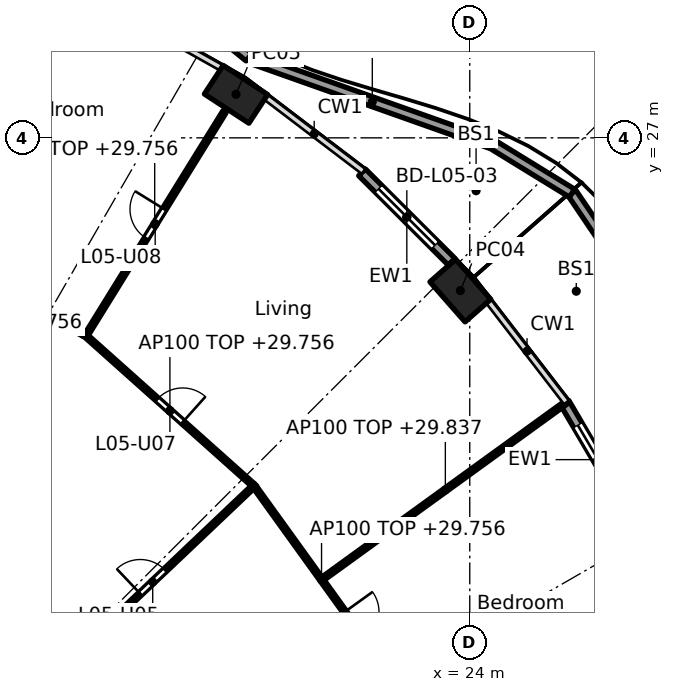
"""IFC4 building model, lengths in metres.
Left out: names, types, materials, properties, quantities, classifications, styles, units other than length and angle.
Written with IfcOpenShell. Run it as: python <this file> out.ifc"""

import sys

from ifc_helpers import new_model, si_unit, direction, frame, frame_2d, origin, origin_2d, place, context, subcontext, project, spatial, rectangle, hollow_rectangle, extrude, element, fill, save


model = new_model("IFC4")
c1 = context("Model", 3, precision=1e-05, world=origin(), true_north=direction((0.0, 1.0)))
c2 = subcontext(c1, "Body", "Model", "MODEL_VIEW")
j1 = project(units=[si_unit("LENGTHUNIT", "METRE"), si_unit("PLANEANGLEUNIT", "RADIAN")], contexts=[c1])
p1 = place(None, origin())
s1 = spatial("IfcSite", under=j1, at=p1, CompositionType="ELEMENT")
p2 = place(p1, origin())
s2 = spatial("IfcBuilding", under=s1, at=p2, CompositionType="ELEMENT")
p3 = place(p2, frame((0.0, 0.0, 27.0)))
s3 = spatial("IfcBuildingStorey", under=s2, at=p3, CompositionType="ELEMENT", Elevation=27.0)
for number, where, z_axis, x_axis in (
    (1, (23.752, 22.981, 0.0), (0.0, 0.0, 1.0), (-0.66, 0.751, 0.0)),
    (2, (17.85, 28.146, 0.0), (0.0, 0.0, 1.0), (-0.836, 0.549, 0.0)),
):
    element("IfcColumn", number, at=place(p3, frame(where, z_axis=z_axis, x_axis=x_axis)), inside=s3, PredefinedType="COLUMN", context=c2, shape_type="SweptSolid", body=[
        extrude(hollow_rectangle(XDim=1.4, YDim=0.9, WallThickness=0.05, at=origin_2d()), origin(), (0.0, 0.0, 1.0), 3.7),
    ])
p4 = place(p3, frame((26.5, 20.026, 0.0), z_axis=(0.0, 0.0, 1.0), x_axis=(0.506311160839, -0.862350861546, 0.0)))
e3 = element("IfcWall", 3, at=p4, inside=s3, PredefinedType="SOLIDWALL", context=c2, shape_type="SweptSolid", body=[
    extrude(rectangle(XDim=3.462, YDim=0.25, at=frame_2d((1.731, 0.0))), origin(), (0.0, 0.0, 1.0), 3.44),
])
p5 = place(p4, frame((0.681, 0.0, 0.0)))
e4 = element("IfcOpeningElement", 4, at=p5, cuts=e3, PredefinedType="OPENING", context=c2, shape_type="SweptSolid", body=[
    extrude(rectangle(XDim=2.1, YDim=2.4, at=frame_2d((1.05, 1.2))), frame((0.0, 0.135, 0.0), z_axis=(0.0, -1.0, 0.0), x_axis=(1.0, 0.0, 0.0)), (0.0, 0.0, 1.0), 0.27),
])
p6 = place(p3, frame((21.166, 26.092, 0.0), z_axis=(0.0, 0.0, 1.0), x_axis=(0.707803094595, -0.706409781417, 0.0)))
e5 = element("IfcWall", 5, at=p6, inside=s3, PredefinedType="SOLIDWALL", context=c2, shape_type="SweptSolid", body=[
    extrude(rectangle(XDim=3.329, YDim=0.25, at=frame_2d((1.665, 0.0))), origin(), (0.0, 0.0, 1.0), 3.44),
])
p7 = place(p6, frame((0.615, 0.0, 0.0)))
e6 = element("IfcOpeningElement", 6, at=p7, cuts=e5, PredefinedType="OPENING", context=c2, shape_type="SweptSolid", body=[
    extrude(rectangle(XDim=2.1, YDim=2.4, at=frame_2d((1.05, 1.2))), frame((0.0, 0.135, 0.0), z_axis=(0.0, -1.0, 0.0), x_axis=(1.0, 0.0, 0.0)), (0.0, 0.0, 1.0), 0.27),
])
p8 = place(p3, frame((28.54, 22.818, 0.0), z_axis=(0.0, 0.0, 1.0), x_axis=(-0.560884144234, 0.827894302883, 0.0)))
e7 = element("IfcWall", 7, at=p8, inside=s3, PredefinedType="PARAPET", context=c2, shape_type="SweptSolid", body=[
    extrude(rectangle(XDim=3.299, YDim=0.25, at=frame_2d((1.649, 0.0))), origin(), (0.0, 0.0, 1.0), 1.1),
])
p9 = place(p3, frame((26.691, 25.545, 0.0), z_axis=(0.0, 0.0, 1.0), x_axis=(-0.852196394013, 0.523222042761, 0.0)))
e8 = element("IfcWall", 8, at=p9, inside=s3, PredefinedType="PARAPET", context=c2, shape_type="SweptSolid", body=[
    extrude(rectangle(XDim=2.428, YDim=0.25, at=frame_2d((1.214, 0.0))), origin(), (0.0, 0.0, 1.0), 1.1),
])
p10 = place(p3, frame((24.573, 26.838, 0.0), z_axis=(0.0, 0.0, 1.0), x_axis=(-0.94252427227, 0.334137690453, 0.0)))
e9 = element("IfcWall", 9, at=p10, inside=s3, PredefinedType="PARAPET", context=c2, shape_type="SweptSolid", body=[
    extrude(rectangle(XDim=6.657, YDim=0.25, at=frame_2d((3.329, 0.0))), origin(), (0.0, 0.0, 1.0), 1.1),
])
p11 = place(p3, frame((18.193, 29.122, 0.0), z_axis=(0.0, 0.0, 1.0), x_axis=(-0.777298307168, 0.62913221319, 0.0)))
e10 = element("IfcWall", 10, at=p11, inside=s3, PredefinedType="PARAPET", context=c2, shape_type="SweptSolid", body=[
    extrude(rectangle(XDim=3.937, YDim=0.25, at=frame_2d((1.968, 0.0))), origin(), (0.0, 0.0, 1.0), 1.1),
])
p12 = place(p3, frame((21.849, 12.948, 0.0), z_axis=(0.0, 0.0, 1.0), x_axis=(-0.584563700282, 0.811347817099, 0.0)))
e11 = element("IfcWall", 11, at=p12, inside=s3, PredefinedType="PARTITIONING", context=c2, shape_type="SweptSolid", body=[
    extrude(rectangle(XDim=5.984, YDim=0.1, at=frame_2d((2.992, 0.0))), origin(), (0.0, 0.0, 1.0), 2.756),
])
p13 = place(p12, frame((1.046, 0.0, 0.0)))
e12 = element("IfcOpeningElement", 12, at=p13, cuts=e11, PredefinedType="OPENING", context=c2, shape_type="SweptSolid", body=[
    extrude(rectangle(XDim=0.9, YDim=2.1, at=frame_2d((0.45, 1.05))), frame((0.0, 0.06, 0.0), z_axis=(0.0, -1.0, 0.0), x_axis=(1.0, 0.0, 0.0)), (0.0, 0.0, 1.0), 0.12),
])
p14 = place(p3, frame((20.141, 15.405, 0.0), z_axis=(0.0, 0.0, 1.0), x_axis=(0.809834895779, 0.58665785734, 0.0)))
e13 = element("IfcWall", 13, at=p14, inside=s3, PredefinedType="PARTITIONING", context=c2, shape_type="SweptSolid", body=[
    extrude(rectangle(XDim=7.945, YDim=0.1, at=frame_2d((3.973, 0.0))), origin(), (0.0, 0.0, 1.0), 2.837),
])
p15 = place(p3, frame((8.957, 8.953, 0.0), z_axis=(0.0, 0.0, 1.0), x_axis=(0.725250022034, 0.688485588476, 0.0)))
e14 = element("IfcWall", 14, at=p15, inside=s3, PredefinedType="PARTITIONING", context=c2, shape_type="SweptSolid", body=[
    extrude(rectangle(XDim=12.963, YDim=0.1, at=frame_2d((6.481, 0.0))), origin(), (0.0, 0.0, 1.0), 2.687),
])
p16 = place(p15, frame((2.333, 0.0, 0.0)))
e15 = element("IfcOpeningElement", 15, at=p16, cuts=e14, PredefinedType="OPENING", context=c2, shape_type="SweptSolid", body=[
    extrude(rectangle(XDim=0.9, YDim=2.1, at=frame_2d((0.45, 1.05))), frame((0.0, 0.06, 0.0), z_axis=(0.0, -1.0, 0.0), x_axis=(1.0, 0.0, 0.0)), (0.0, 0.0, 1.0), 0.12),
])
p17 = place(p15, frame((8.79, 0.0, 0.0)))
e16 = element("IfcOpeningElement", 16, at=p17, cuts=e14, PredefinedType="OPENING", context=c2, shape_type="SweptSolid", body=[
    extrude(rectangle(XDim=0.9, YDim=2.1, at=frame_2d((0.45, 1.05))), frame((0.0, 0.06, 0.0), z_axis=(0.0, -1.0, 0.0), x_axis=(1.0, 0.0, 0.0)), (0.0, 0.0, 1.0), 0.12),
])
p18 = place(p3, frame((18.285, 17.877, 0.0), z_axis=(0.0, 0.0, 1.0), x_axis=(-0.745806142791, 0.666163041136, 0.0)))
e17 = element("IfcWall", 17, at=p18, inside=s3, PredefinedType="PARTITIONING", context=c2, shape_type="SweptSolid", body=[
    extrude(rectangle(XDim=5.831, YDim=0.1, at=frame_2d((2.915, 0.0))), origin(), (0.0, 0.0, 1.0), 2.756),
])
p19 = place(p18, frame((2.465, 0.0, 0.0)))
e18 = element("IfcOpeningElement", 18, at=p19, cuts=e17, PredefinedType="OPENING", context=c2, shape_type="SweptSolid", body=[
    extrude(rectangle(XDim=0.9, YDim=2.1, at=frame_2d((0.45, 1.05))), frame((0.0, 0.06, 0.0), z_axis=(0.0, -1.0, 0.0), x_axis=(1.0, 0.0, 0.0)), (0.0, 0.0, 1.0), 0.12),
])
p20 = place(p3, frame((13.873, 21.752, 0.0), z_axis=(0.0, 0.0, 1.0), x_axis=(0.52644491616, 0.850209239099, 0.0)))
e19 = element("IfcWall", 19, at=p20, inside=s3, PredefinedType="PARTITIONING", context=c2, shape_type="SweptSolid", body=[
    extrude(rectangle(XDim=6.98, YDim=0.1, at=frame_2d((3.49, 0.0))), origin(), (0.0, 0.0, 1.0), 2.756),
])
p21 = place(p20, frame((3.065, 0.0, 0.0)))
e20 = element("IfcOpeningElement", 20, at=p21, cuts=e19, PredefinedType="OPENING", context=c2, shape_type="SweptSolid", body=[
    extrude(rectangle(XDim=0.9, YDim=2.1, at=frame_2d((0.45, 1.05))), frame((0.0, 0.06, 0.0), z_axis=(0.0, -1.0, 0.0), x_axis=(1.0, 0.0, 0.0)), (0.0, 0.0, 1.0), 0.12),
])
p22 = place(p3, frame((13.855, 21.818, 0.0), z_axis=(0.0, 0.0, 1.0), x_axis=(-0.876809987787, 0.480837025734, 0.0)))
e21 = element("IfcWall", 21, at=p22, inside=s3, PredefinedType="PARTITIONING", context=c2, shape_type="SweptSolid", body=[
    extrude(rectangle(XDim=5.486, YDim=0.1, at=frame_2d((2.743, 0.0))), origin(), (0.0, 0.0, 1.0), 2.756),
])
p23 = place(p5, origin())
e22 = element("IfcDoor", 22, at=p23, inside=s3, OperationType="SLIDING_TO_LEFT", PredefinedType="DOOR", context=c2, shape_type="SweptSolid", body=[
    extrude(rectangle(XDim=2.1, YDim=2.4, at=frame_2d((1.05, 1.2))), frame((0.0, 0.025, 0.0), z_axis=(0.0, -1.0, 0.0), x_axis=(1.0, 0.0, 0.0)), (0.0, 0.0, 1.0), 0.05),
])
fill(e4, e22)
p24 = place(p7, origin())
e23 = element("IfcDoor", 23, at=p24, inside=s3, OperationType="SLIDING_TO_LEFT", PredefinedType="DOOR", context=c2, shape_type="SweptSolid", body=[
    extrude(rectangle(XDim=2.1, YDim=2.4, at=frame_2d((1.05, 1.2))), frame((0.0, 0.025, 0.0), z_axis=(0.0, -1.0, 0.0), x_axis=(1.0, 0.0, 0.0)), (0.0, 0.0, 1.0), 0.05),
])
fill(e6, e23)
p25 = place(p17, origin())
e24 = element("IfcDoor", 24, at=p25, inside=s3, OperationType="SINGLE_SWING_LEFT", PredefinedType="DOOR", context=c2, shape_type="SweptSolid", body=[
    extrude(rectangle(XDim=0.9, YDim=2.1, at=frame_2d((0.45, 1.05))), frame((0.0, 0.025, 0.0), z_axis=(0.0, -1.0, 0.0), x_axis=(1.0, 0.0, 0.0)), (0.0, 0.0, 1.0), 0.05),
])
fill(e16, e24)
p26 = place(p13, frame((0.9, 0.0, 0.0), x_axis=(-1.0, 0.0, 0.0)))
e25 = element("IfcDoor", 25, at=p26, inside=s3, OperationType="SINGLE_SWING_LEFT", PredefinedType="DOOR", context=c2, shape_type="SweptSolid", body=[
    extrude(rectangle(XDim=0.9, YDim=2.1, at=frame_2d((0.45, 1.05))), frame((0.0, 0.025, 0.0), z_axis=(0.0, -1.0, 0.0), x_axis=(1.0, 0.0, 0.0)), (0.0, 0.0, 1.0), 0.05),
])
fill(e12, e25)
p27 = place(p19, frame((0.9, 0.0, 0.0), x_axis=(-1.0, 0.0, 0.0)))
e26 = element("IfcDoor", 26, at=p27, inside=s3, OperationType="SINGLE_SWING_RIGHT", PredefinedType="DOOR", context=c2, shape_type="SweptSolid", body=[
    extrude(rectangle(XDim=0.9, YDim=2.1, at=frame_2d((0.45, 1.05))), frame((0.0, 0.025, 0.0), z_axis=(0.0, -1.0, 0.0), x_axis=(1.0, 0.0, 0.0)), (0.0, 0.0, 1.0), 0.05),
])
fill(e18, e26)
p28 = place(p21, origin())
e27 = element("IfcDoor", 27, at=p28, inside=s3, OperationType="SINGLE_SWING_RIGHT", PredefinedType="DOOR", context=c2, shape_type="SweptSolid", body=[
    extrude(rectangle(XDim=0.9, YDim=2.1, at=frame_2d((0.45, 1.05))), frame((0.0, 0.025, 0.0), z_axis=(0.0, -1.0, 0.0), x_axis=(1.0, 0.0, 0.0)), (0.0, 0.0, 1.0), 0.05),
])
fill(e20, e27)
save(model, sys.argv[1])
